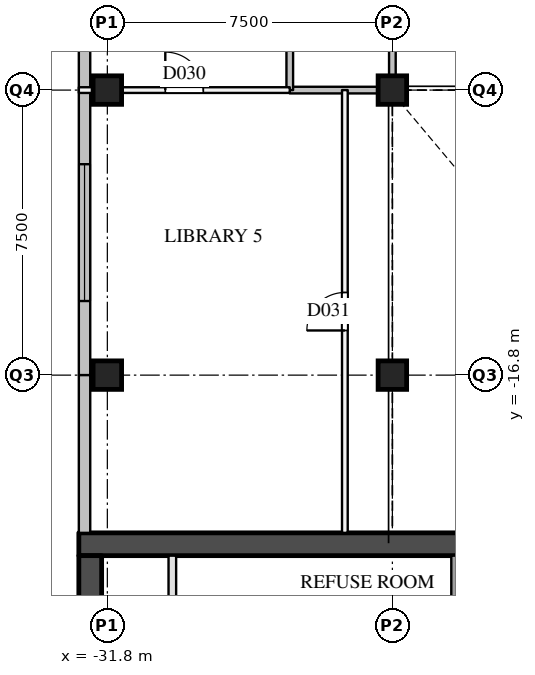
"""IFC4 building model, lengths in metres.
Left out: names, types, materials, properties, quantities, classifications, styles, units other than length and angle.
Written with IfcOpenShell. Run it as: python <this file> out.ifc"""

import sys

from ifc_helpers import new_model, si_unit, direction, frame, frame_2d, origin, origin_2d, place, context, subcontext, project, spatial, rectangle, extrude, element, fill, save


model = new_model("IFC4")
c1 = context("Model", 3, precision=1e-05, world=origin(), true_north=direction((0.0, 1.0)))
c2 = subcontext(c1, "Body", "Model", "MODEL_VIEW")
j1 = project(units=[si_unit("LENGTHUNIT", "METRE"), si_unit("PLANEANGLEUNIT", "RADIAN")], contexts=[c1])
p1 = place(None, origin())
s1 = spatial("IfcSite", under=j1, at=p1, CompositionType="ELEMENT")
p2 = place(p1, origin())
s2 = spatial("IfcBuilding", under=s1, at=p2, CompositionType="ELEMENT")
p3 = place(p2, frame((0.0, 0.0, 21.0)))
s3 = spatial("IfcBuildingStorey", under=s2, at=p3, CompositionType="ELEMENT", Elevation=21.0)
for number, where, z_axis, x_axis in (
    (1, (-31.8, -16.8, 0.0), (0.0, 0.0, 1.0), (1.0, 0.0, 0.0)),
    (2, (-31.8, -9.3, 0.0), (0.0, 0.0, 1.0), (1.0, 0.0, 0.0)),
    (3, (-24.3, -16.8, 0.0), (0.0, 0.0, 1.0), (1.0, 0.0, 0.0)),
    (4, (-24.3, -9.3, 0.0), (0.0, 0.0, 1.0), (1.0, 0.0, 0.0)),
):
    element("IfcColumn", number, at=place(p3, frame(where, z_axis=z_axis, x_axis=x_axis)), inside=s3, PredefinedType="COLUMN", context=c2, shape_type="SweptSolid", body=[
        extrude(rectangle(XDim=0.75, YDim=0.75, at=origin_2d()), origin(), (0.0, 0.0, 1.0), 5.0),
    ])
p4 = place(p3, frame((-32.4, -1.8, 0.0), z_axis=(0.0, 0.0, 1.0), x_axis=(0.0, -1.0, 0.0)))
e5 = element("IfcWall", 5, at=p4, inside=s3, PredefinedType="SOLIDWALL", context=c2, shape_type="SweptSolid", body=[
    extrude(rectangle(XDim=7.5, YDim=0.3, at=frame_2d((3.75, 0.0))), origin(), (0.0, 0.0, 1.0), 4.59),
])
p5 = place(p4, frame((1.95, 0.0, 2.4)))
e6 = element("IfcOpeningElement", 6, at=p5, cuts=e5, PredefinedType="OPENING", context=c2, shape_type="SweptSolid", body=[
    extrude(rectangle(XDim=3.6, YDim=1.2, at=frame_2d((1.8, 0.6))), frame((0.0, 0.16, 0.0), z_axis=(0.0, -1.0, 0.0), x_axis=(1.0, 0.0, 0.0)), (0.0, 0.0, 1.0), 0.32),
])
p6 = place(p3, frame((-32.4, -9.3, 0.0), z_axis=(0.0, 0.0, 1.0), x_axis=(0.0, -1.0, 0.0)))
e7 = element("IfcWall", 7, at=p6, inside=s3, PredefinedType="SOLIDWALL", context=c2, shape_type="SweptSolid", body=[
    extrude(rectangle(XDim=7.5, YDim=0.3, at=frame_2d((3.75, 0.0))), origin(), (0.0, 0.0, 1.0), 4.59),
])
p7 = place(p6, frame((1.95, 0.0, 2.4)))
e8 = element("IfcOpeningElement", 8, at=p7, cuts=e7, PredefinedType="OPENING", context=c2, shape_type="SweptSolid", body=[
    extrude(rectangle(XDim=3.6, YDim=1.2, at=frame_2d((1.8, 0.6))), frame((0.0, 0.16, 0.0), z_axis=(0.0, -1.0, 0.0), x_axis=(1.0, 0.0, 0.0)), (0.0, 0.0, 1.0), 0.32),
])
p8 = place(p3, frame((-32.4, -16.8, 0.0), z_axis=(0.0, 0.0, 1.0), x_axis=(0.0, -1.0, 0.0)))
e9 = element("IfcWall", 9, at=p8, inside=s3, PredefinedType="SOLIDWALL", context=c2, shape_type="SweptSolid", body=[
    extrude(rectangle(XDim=4.15, YDim=0.3, at=frame_2d((2.075, 0.0))), origin(), (0.0, 0.0, 1.0), 4.59),
])
p9 = place(p3, frame((-32.55, -21.25, 0.0), z_axis=(0.0, 0.0, 1.0), x_axis=(1.0, 0.0, 0.0)))
e10 = element("IfcWall", 10, at=p9, inside=s3, PredefinedType="SHEAR", context=c2, shape_type="SweptSolid", body=[
    extrude(rectangle(XDim=12.2, YDim=0.6, at=frame_2d((6.1, 0.0))), origin(), (0.0, 0.0, 1.0), 4.55),
])
p10 = place(p3, frame((-32.25, -31.95, 0.0), z_axis=(0.0, 0.0, 1.0), x_axis=(0.0, 1.0, 0.0)))
e11 = element("IfcWall", 11, at=p10, inside=s3, PredefinedType="SHEAR", context=c2, shape_type="SweptSolid", body=[
    extrude(rectangle(XDim=10.4, YDim=0.6, at=frame_2d((5.2, 0.0))), origin(), (0.0, 0.0, 1.0), 4.55),
])
p11 = place(p3, frame((-30.09, -23.75, 0.0), z_axis=(0.0, 0.0, 1.0), x_axis=(0.0, 1.0, 0.0)))
e12 = element("IfcWall", 12, at=p11, inside=s3, PredefinedType="PARTITIONING", context=c2, shape_type="SweptSolid", body=[
    extrude(rectangle(XDim=2.2, YDim=0.2, at=frame_2d((1.1, 0.0))), origin(), (0.0, 0.0, 1.0), 4.55),
])
p12 = place(p3, frame((-22.65, -23.75, 0.0), z_axis=(0.0, 0.0, 1.0), x_axis=(0.0, 1.0, 0.0)))
e13 = element("IfcWall", 13, at=p12, inside=s3, PredefinedType="SOLIDWALL", context=c2, shape_type="SweptSolid", body=[
    extrude(rectangle(XDim=2.2, YDim=0.2, at=frame_2d((1.1, 0.0))), origin(), (0.0, 0.0, 1.0), 4.55),
])
p13 = place(p3, frame((-27.0, -9.3, 0.0), z_axis=(0.0, 0.0, 1.0), x_axis=(1.0, 0.0, 0.0)))
e14 = element("IfcWall", 14, at=p13, inside=s3, PredefinedType="PARTITIONING", context=c2, shape_type="SweptSolid", body=[
    extrude(rectangle(XDim=2.7, YDim=0.175, at=frame_2d((1.35, 0.0))), origin(), (0.0, 0.0, 1.0), 3.79),
])
p14 = place(p3, frame((-27.0, -9.3, 0.0), z_axis=(0.0, 0.0, 1.0), x_axis=(0.0, 1.0, 0.0)))
e15 = element("IfcWall", 15, at=p14, inside=s3, PredefinedType="PARTITIONING", context=c2, shape_type="SweptSolid", body=[
    extrude(rectangle(XDim=6.0, YDim=0.175, at=frame_2d((3.0, 0.0))), origin(), (0.0, 0.0, 1.0), 3.79),
])
p15 = place(p14, frame((2.5, 0.0, 0.0)))
e16 = element("IfcOpeningElement", 16, at=p15, cuts=e15, PredefinedType="OPENING", context=c2, shape_type="SweptSolid", body=[
    extrude(rectangle(XDim=1.0, YDim=2.1, at=frame_2d((0.5, 1.05))), frame((0.0, 0.097, 0.0), z_axis=(0.0, -1.0, 0.0), x_axis=(1.0, 0.0, 0.0)), (0.0, 0.0, 1.0), 0.195),
])
p16 = place(p3, frame((-24.3, -9.3, 0.0), z_axis=(0.0, 0.0, 1.0), x_axis=(0.0, 1.0, 0.0)))
e17 = element("IfcWall", 17, at=p16, inside=s3, PredefinedType="PARTITIONING", context=c2, shape_type="SweptSolid", body=[
    extrude(rectangle(XDim=21.3, YDim=0.175, at=frame_2d((10.65, 0.0))), origin(), (0.0, 0.0, 1.0), 3.79),
])
p17 = place(p16, frame((2.5, 0.0, 0.0)))
e18 = element("IfcOpeningElement", 18, at=p17, cuts=e17, PredefinedType="OPENING", context=c2, shape_type="SweptSolid", body=[
    extrude(rectangle(XDim=1.0, YDim=2.1, at=frame_2d((0.5, 1.05))), frame((0.0, 0.097, 0.0), z_axis=(0.0, -1.0, 0.0), x_axis=(1.0, 0.0, 0.0)), (0.0, 0.0, 1.0), 0.195),
])
p18 = place(p16, frame((16.3, 0.0, 0.0)))
e19 = element("IfcOpeningElement", 19, at=p18, cuts=e17, PredefinedType="OPENING", context=c2, shape_type="SweptSolid", body=[
    extrude(rectangle(XDim=1.0, YDim=2.1, at=frame_2d((0.5, 1.05))), frame((0.0, 0.097, 0.0), z_axis=(0.0, -1.0, 0.0), x_axis=(1.0, 0.0, 0.0)), (0.0, 0.0, 1.0), 0.195),
])
p19 = place(p3, frame((-32.55, -9.3, 0.0), z_axis=(0.0, 0.0, 1.0), x_axis=(1.0, 0.0, 0.0)))
e20 = element("IfcWall", 20, at=p19, inside=s3, PredefinedType="PARTITIONING", context=c2, shape_type="SweptSolid", body=[
    extrude(rectangle(XDim=5.55, YDim=0.15, at=frame_2d((2.775, 0.0))), origin(), (0.0, 0.0, 1.0), 3.79),
])
p20 = place(p19, frame((2.275, 0.0, 0.0)))
e21 = element("IfcOpeningElement", 21, at=p20, cuts=e20, PredefinedType="OPENING", context=c2, shape_type="SweptSolid", body=[
    extrude(rectangle(XDim=1.0, YDim=2.1, at=frame_2d((0.5, 1.05))), frame((0.0, 0.085, 0.0), z_axis=(0.0, -1.0, 0.0), x_axis=(1.0, 0.0, 0.0)), (0.0, 0.0, 1.0), 0.17),
])
p21 = place(p3, frame((-25.55, -20.95, 0.0), z_axis=(0.0, 0.0, 1.0), x_axis=(0.0, 1.0, 0.0)))
e22 = element("IfcWall", 22, at=p21, inside=s3, PredefinedType="PARTITIONING", context=c2, shape_type="SweptSolid", body=[
    extrude(rectangle(XDim=11.65, YDim=0.15, at=frame_2d((5.825, 0.0))), origin(), (0.0, 0.0, 1.0), 3.79),
])
p22 = place(p21, frame((5.325, 0.0, 0.0)))
e23 = element("IfcOpeningElement", 23, at=p22, cuts=e22, PredefinedType="OPENING", context=c2, shape_type="SweptSolid", body=[
    extrude(rectangle(XDim=1.0, YDim=2.1, at=frame_2d((0.5, 1.05))), frame((0.0, 0.085, 0.0), z_axis=(0.0, -1.0, 0.0), x_axis=(1.0, 0.0, 0.0)), (0.0, 0.0, 1.0), 0.17),
])
p23 = place(p7, origin())
e24 = element("IfcWindow", 24, at=p23, inside=s3, PartitioningType="SINGLE_PANEL", PredefinedType="WINDOW", context=c2, shape_type="SweptSolid", body=[
    extrude(rectangle(XDim=3.6, YDim=1.2, at=frame_2d((1.8, 0.6))), frame((0.0, 0.03, 0.0), z_axis=(0.0, -1.0, 0.0), x_axis=(1.0, 0.0, 0.0)), (0.0, 0.0, 1.0), 0.06),
])
fill(e8, e24)
p24 = place(p20, origin())
e25 = element("IfcDoor", 25, at=p24, inside=s3, OperationType="SINGLE_SWING_LEFT", PredefinedType="DOOR", context=c2, shape_type="SweptSolid", body=[
    extrude(rectangle(XDim=1.0, YDim=2.1, at=frame_2d((0.5, 1.05))), frame((0.0, 0.025, 0.0), z_axis=(0.0, -1.0, 0.0), x_axis=(1.0, 0.0, 0.0)), (0.0, 0.0, 1.0), 0.05),
])
fill(e21, e25)
p25 = place(p22, origin())
e26 = element("IfcDoor", 26, at=p25, inside=s3, OperationType="SINGLE_SWING_LEFT", PredefinedType="DOOR", context=c2, shape_type="SweptSolid", body=[
    extrude(rectangle(XDim=1.0, YDim=2.1, at=frame_2d((0.5, 1.05))), frame((0.0, 0.025, 0.0), z_axis=(0.0, -1.0, 0.0), x_axis=(1.0, 0.0, 0.0)), (0.0, 0.0, 1.0), 0.05),
])
fill(e23, e26)
save(model, sys.argv[1])
